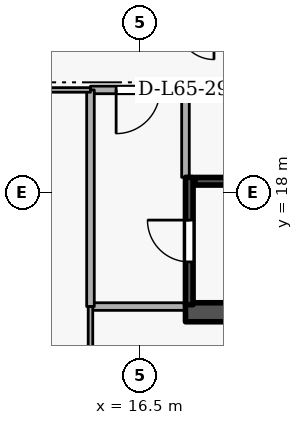
"""IFC4 building model, lengths in metres.
Left out: names, types, materials, properties, quantities, classifications, styles, units other than length and angle.
Written with IfcOpenShell. Run it as: python <this file> out.ifc"""

import sys

from ifc_helpers import new_model, si_unit, direction, frame, frame_2d, origin, place, context, subcontext, project, spatial, rectangle, extrude, element, fill, save


model = new_model("IFC4")
c1 = context("Model", 3, precision=1e-05, world=origin(), true_north=direction((0.0, 1.0)))
c2 = subcontext(c1, "Body", "Model", "MODEL_VIEW")
j1 = project(units=[si_unit("LENGTHUNIT", "METRE"), si_unit("PLANEANGLEUNIT", "RADIAN")], contexts=[c1])
p1 = place(None, origin())
s1 = spatial("IfcSite", under=j1, at=p1, CompositionType="ELEMENT")
p2 = place(p1, origin())
s2 = spatial("IfcBuilding", under=s1, at=p2, CompositionType="ELEMENT")
p3 = place(p2, frame((0.0, 0.0, 243.9)))
s3 = spatial("IfcBuildingStorey", under=s2, at=p3, CompositionType="ELEMENT", Elevation=243.9)
p4 = place(p3, frame((17.7, 14.85, 0.0), z_axis=(0.0, 0.0, 1.0), x_axis=(1.0, 0.0, 0.0)))
e1 = element("IfcWall", 1, at=p4, inside=s3, PredefinedType="SHEAR", context=c2, shape_type="SweptSolid", body=[
    extrude(rectangle(XDim=15.6, YDim=0.5, at=frame_2d((7.8, 0.0))), origin(), (0.0, 0.0, 1.0), 3.6),
])
p5 = place(p3, frame((17.8, 15.05, 0.0), z_axis=(0.0, 0.0, 1.0), x_axis=(0.0, 1.0, 0.0)))
e2 = element("IfcWall", 2, at=p5, inside=s3, PredefinedType="SHEAR", context=c2, shape_type="SweptSolid", body=[
    extrude(rectangle(XDim=3.35, YDim=0.2, at=frame_2d((1.675, 0.0))), origin(), (0.0, 0.0, 1.0), 3.6),
])
p6 = place(p5, frame((1.125, 0.0, 0.0)))
e3 = element("IfcOpeningElement", 3, at=p6, cuts=e2, PredefinedType="OPENING", context=c2, shape_type="SweptSolid", body=[
    extrude(rectangle(XDim=1.1, YDim=2.1, at=frame_2d((0.55, 1.05))), frame((0.0, 0.11, 0.0), z_axis=(0.0, -1.0, 0.0), x_axis=(1.0, 0.0, 0.0)), (0.0, 0.0, 1.0), 0.22),
])
p7 = place(p3, frame((25.05, 18.297, 0.0), z_axis=(0.0, 0.0, 1.0), x_axis=(-1.0, 0.0, 0.0)))
e4 = element("IfcWall", 4, at=p7, inside=s3, PredefinedType="SHEAR", context=c2, shape_type="SweptSolid", body=[
    extrude(rectangle(XDim=7.1, YDim=0.2, at=frame_2d((3.55, 0.0))), origin(), (0.0, 0.0, 1.0), 3.6),
])
p8 = place(p3, frame((15.2, 15.0, 0.0), z_axis=(0.0, 0.0, 1.0), x_axis=(1.0, 0.0, 0.0)))
e5 = element("IfcWall", 5, at=p8, inside=s3, PredefinedType="STANDARD", context=c2, shape_type="SweptSolid", body=[
    extrude(rectangle(XDim=2.5, YDim=0.2, at=frame_2d((1.25, 0.0))), origin(), (0.0, 0.0, 1.0), 3.34),
])
p9 = place(p3, frame((17.7, 18.4, 0.0), z_axis=(0.0, 0.0, 1.0), x_axis=(0.0, 1.0, 0.0)))
e6 = element("IfcWall", 6, at=p9, inside=s3, PredefinedType="STANDARD", context=c2, shape_type="SweptSolid", body=[
    extrude(rectangle(XDim=2.3, YDim=0.2, at=frame_2d((1.15, 0.0))), origin(), (0.0, 0.0, 1.0), 2.545),
])
p10 = place(p3, frame((17.7, 20.7, 0.0), z_axis=(0.0, 0.0, 1.0), x_axis=(-1.0, 0.0, 0.0)))
e7 = element("IfcWall", 7, at=p10, inside=s3, PredefinedType="STANDARD", context=c2, shape_type="SweptSolid", body=[
    extrude(rectangle(XDim=2.5, YDim=0.2, at=frame_2d((1.25, 0.0))), origin(), (0.0, 0.0, 1.0), 3.34),
])
p11 = place(p10, frame((0.675, 0.0, 0.0)))
e8 = element("IfcOpeningElement", 8, at=p11, cuts=e7, PredefinedType="OPENING", context=c2, shape_type="SweptSolid", body=[
    extrude(rectangle(XDim=1.15, YDim=2.1, at=frame_2d((0.575, 1.05))), frame((0.0, 0.11, 0.0), z_axis=(0.0, -1.0, 0.0), x_axis=(1.0, 0.0, 0.0)), (0.0, 0.0, 1.0), 0.22),
])
p12 = place(p3, frame((15.2, 20.7, 0.0), z_axis=(0.0, 0.0, 1.0), x_axis=(0.0, -1.0, 0.0)))
e9 = element("IfcWall", 9, at=p12, inside=s3, PredefinedType="STANDARD", context=c2, shape_type="SweptSolid", body=[
    extrude(rectangle(XDim=5.7, YDim=0.2, at=frame_2d((2.85, 0.0))), origin(), (0.0, 0.0, 1.0), 3.34),
])
p13 = place(p3, frame((13.25, 20.7, 0.0), z_axis=(0.0, 0.0, 1.0), x_axis=(1.0, 0.0, 0.0)))
e10 = element("IfcWall", 10, at=p13, inside=s3, PredefinedType="PARTITIONING", context=c2, shape_type="SweptSolid", body=[
    extrude(rectangle(XDim=1.95, YDim=0.12, at=frame_2d((0.975, 0.0))), origin(), (0.0, 0.0, 1.0), 3.34),
])
p14 = place(p3, frame((15.2, 15.0, 0.0), z_axis=(0.0, 0.0, 1.0), x_axis=(0.0, -1.0, 0.0)))
e11 = element("IfcWall", 11, at=p14, inside=s3, PredefinedType="PARTITIONING", context=c2, shape_type="SweptSolid", body=[
    extrude(rectangle(XDim=11.72, YDim=0.12, at=frame_2d((5.86, 0.0))), origin(), (0.0, 0.0, 1.0), 3.34),
])
p15 = place(p6, origin())
e12 = element("IfcDoor", 12, at=p15, inside=s3, OperationType="SINGLE_SWING_RIGHT", PredefinedType="DOOR", context=c2, shape_type="SweptSolid", body=[
    extrude(rectangle(XDim=1.1, YDim=2.1, at=frame_2d((0.55, 1.05))), frame((0.0, 0.025, 0.0), z_axis=(0.0, -1.0, 0.0), x_axis=(1.0, 0.0, 0.0)), (0.0, 0.0, 1.0), 0.05),
])
fill(e3, e12)
p16 = place(p11, origin())
e13 = element("IfcDoor", 13, at=p16, inside=s3, OperationType="SINGLE_SWING_RIGHT", PredefinedType="DOOR", context=c2, shape_type="SweptSolid", body=[
    extrude(rectangle(XDim=1.15, YDim=2.1, at=frame_2d((0.575, 1.05))), frame((0.0, 0.025, 0.0), z_axis=(0.0, -1.0, 0.0), x_axis=(1.0, 0.0, 0.0)), (0.0, 0.0, 1.0), 0.05),
])
fill(e8, e13)
save(model, sys.argv[1])
